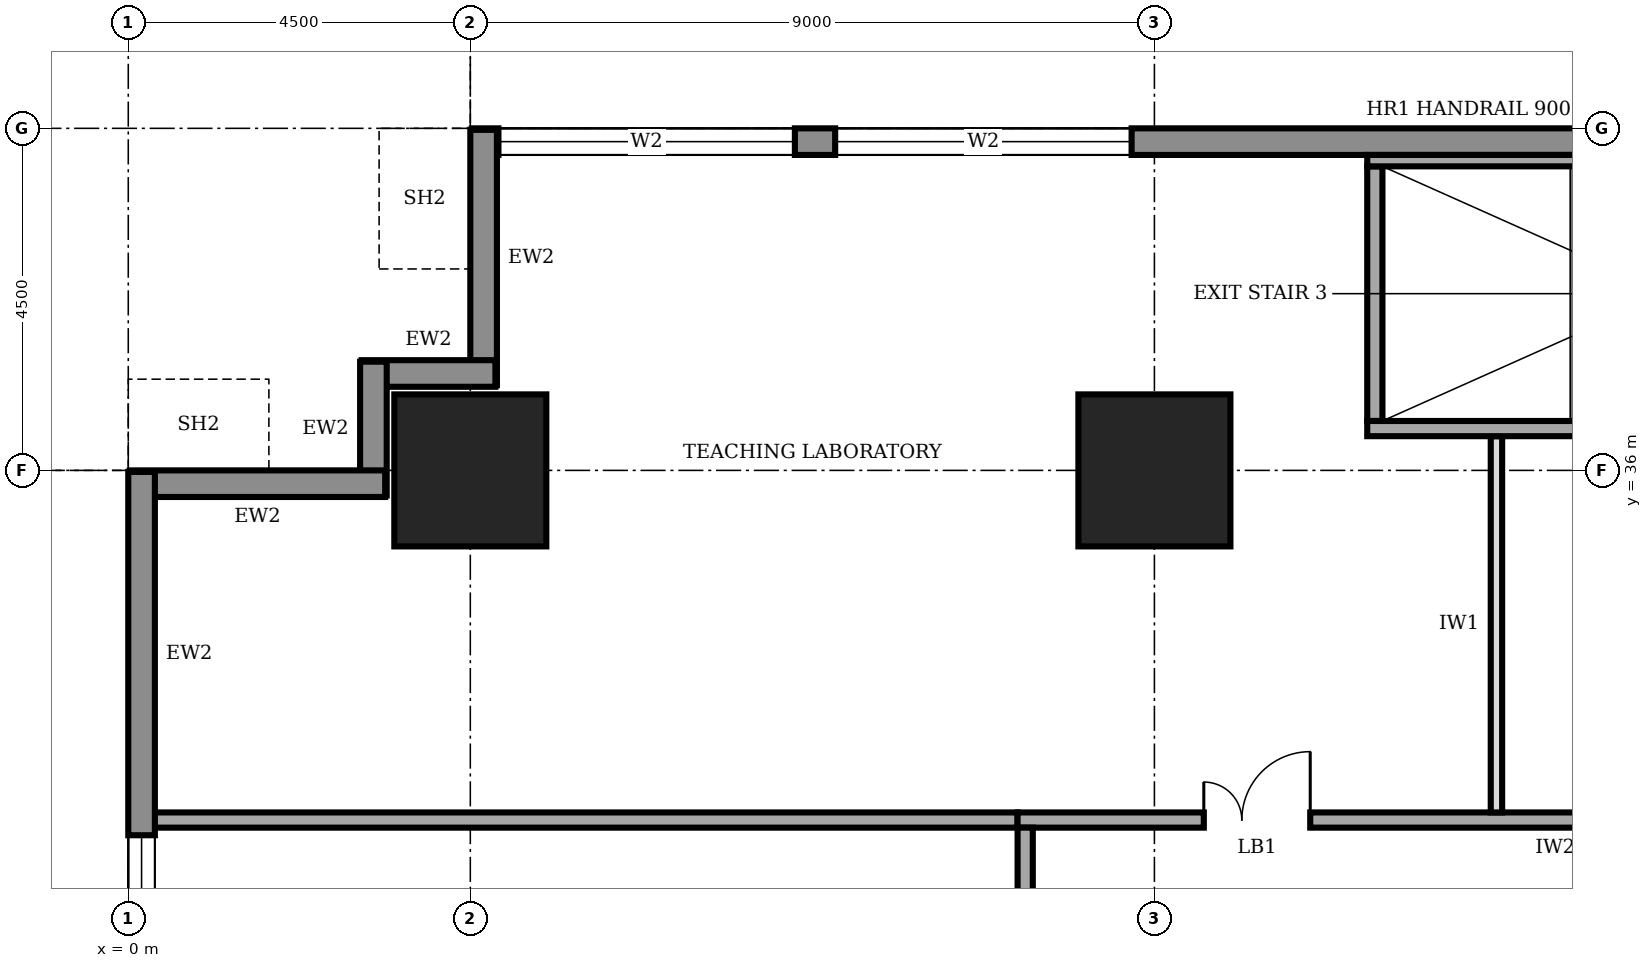
"""IFC4 building model, lengths in metres.
Left out: names, types, materials, properties, quantities, classifications, styles, units other than length and angle.
Written with IfcOpenShell. Run it as: python <this file> out.ifc"""

import sys

from ifc_helpers import new_model, si_unit, direction, frame, frame_2d, origin, origin_2d, place, context, subcontext, project, spatial, rectangle, extrude, element, fill, save


model = new_model("IFC4")
c1 = context("Model", 3, precision=1e-05, world=origin(), true_north=direction((0.0, 1.0)))
c2 = subcontext(c1, "Body", "Model", "MODEL_VIEW")
j1 = project(units=[si_unit("LENGTHUNIT", "METRE"), si_unit("PLANEANGLEUNIT", "RADIAN")], contexts=[c1])
p1 = place(None, origin())
s1 = spatial("IfcSite", under=j1, at=p1, CompositionType="ELEMENT")
p2 = place(p1, origin())
s2 = spatial("IfcBuilding", under=s1, at=p2, CompositionType="ELEMENT")
p3 = place(p2, frame((0.0, 0.0, 61.0)))
s3 = spatial("IfcBuildingStorey", under=s2, at=p3, CompositionType="ELEMENT", Elevation=61.0)
for number, where, z_axis, x_axis in (
    (1, (4.5, 36.0, 0.0), (0.0, 0.0, 1.0), (1.0, 0.0, 0.0)),
    (2, (13.5, 36.0, 0.0), (0.0, 0.0, 1.0), (1.0, 0.0, 0.0)),
):
    element("IfcColumn", number, at=place(p3, frame(where, z_axis=z_axis, x_axis=x_axis)), inside=s3, PredefinedType="COLUMN", context=c2, shape_type="SweptSolid", body=[
        extrude(rectangle(XDim=2.0, YDim=2.0, at=origin_2d()), origin(), (0.0, 0.0, 1.0), 4.0),
    ])
p4 = place(p3, frame((35.98, 40.325, 0.0), z_axis=(0.0, 0.0, 1.0), x_axis=(-1.0, 0.0, 0.0)))
e3 = element("IfcWall", 3, at=p4, inside=s3, PredefinedType="STANDARD", context=c2, shape_type="SweptSolid", body=[
    extrude(rectangle(XDim=31.46, YDim=0.35, at=frame_2d((15.73, 0.0))), origin(), (0.0, 0.0, 1.0), 3.75),
])
p5 = place(p4, frame((27.21, 0.0, 0.6)))
e4 = element("IfcOpeningElement", 4, at=p5, cuts=e3, PredefinedType="OPENING", context=c2, shape_type="SweptSolid", body=[
    extrude(rectangle(XDim=3.9, YDim=2.6, at=frame_2d((1.95, 1.3))), frame((0.0, 0.185, 0.0), z_axis=(0.0, -1.0, 0.0), x_axis=(1.0, 0.0, 0.0)), (0.0, 0.0, 1.0), 0.37),
])
p6 = place(p4, frame((22.78, 0.0, 0.6)))
e5 = element("IfcOpeningElement", 5, at=p6, cuts=e3, PredefinedType="OPENING", context=c2, shape_type="SweptSolid", body=[
    extrude(rectangle(XDim=3.9, YDim=2.6, at=frame_2d((1.95, 1.3))), frame((0.0, 0.185, 0.0), z_axis=(0.0, -1.0, 0.0), x_axis=(1.0, 0.0, 0.0)), (0.0, 0.0, 1.0), 0.37),
])
p7 = place(p4, frame((4.78, 0.0, 0.6)))
e6 = element("IfcOpeningElement", 6, at=p7, cuts=e3, PredefinedType="OPENING", context=c2, shape_type="SweptSolid", body=[
    extrude(rectangle(XDim=3.9, YDim=2.6, at=frame_2d((1.95, 1.3))), frame((0.0, 0.185, 0.0), z_axis=(0.0, -1.0, 0.0), x_axis=(1.0, 0.0, 0.0)), (0.0, 0.0, 1.0), 0.37),
])
p8 = place(p3, frame((4.675, 40.48, 0.0), z_axis=(0.0, 0.0, 1.0), x_axis=(0.0, -1.0, 0.0)))
e7 = element("IfcWall", 7, at=p8, inside=s3, PredefinedType="STANDARD", context=c2, shape_type="SweptSolid", body=[
    extrude(rectangle(XDim=3.36, YDim=0.35, at=frame_2d((1.68, 0.0))), origin(), (0.0, 0.0, 1.0), 2.85),
])
for number, where, z_axis, x_axis in (
    (8, (4.83, 37.275, 0.0), (0.0, 0.0, 1.0), (-1.0, 0.0, 0.0)),
    (9, (3.225, 37.43, 0.0), (0.0, 0.0, 1.0), (0.0, -1.0, 0.0)),
):
    element("IfcWall", number, at=place(p3, frame(where, z_axis=z_axis, x_axis=x_axis)), inside=s3, PredefinedType="STANDARD", context=c2, shape_type="SweptSolid", body=[
        extrude(rectangle(XDim=1.76, YDim=0.35, at=frame_2d((0.88, 0.0))), origin(), (0.0, 0.0, 1.0), 3.75),
    ])
p9 = place(p3, frame((3.38, 35.825, 0.0), z_axis=(0.0, 0.0, 1.0), x_axis=(-1.0, 0.0, 0.0)))
e10 = element("IfcWall", 10, at=p9, inside=s3, PredefinedType="STANDARD", context=c2, shape_type="SweptSolid", body=[
    extrude(rectangle(XDim=3.36, YDim=0.35, at=frame_2d((1.68, 0.0))), origin(), (0.0, 0.0, 1.0), 2.85),
])
p10 = place(p3, frame((0.175, 35.98, 0.0), z_axis=(0.0, 0.0, 1.0), x_axis=(0.0, -1.0, 0.0)))
e11 = element("IfcWall", 11, at=p10, inside=s3, PredefinedType="STANDARD", context=c2, shape_type="SweptSolid", body=[
    extrude(rectangle(XDim=31.46, YDim=0.35, at=frame_2d((15.73, 0.0))), origin(), (0.0, 0.0, 1.0), 3.75),
])
p11 = place(p10, frame((27.21, 0.0, 0.6)))
e12 = element("IfcOpeningElement", 12, at=p11, cuts=e11, PredefinedType="OPENING", context=c2, shape_type="SweptSolid", body=[
    extrude(rectangle(XDim=3.9, YDim=2.6, at=frame_2d((1.95, 1.3))), frame((0.0, 0.185, 0.0), z_axis=(0.0, -1.0, 0.0), x_axis=(1.0, 0.0, 0.0)), (0.0, 0.0, 1.0), 0.37),
])
p12 = place(p10, frame((22.78, 0.0, 0.6)))
e13 = element("IfcOpeningElement", 13, at=p12, cuts=e11, PredefinedType="OPENING", context=c2, shape_type="SweptSolid", body=[
    extrude(rectangle(XDim=3.9, YDim=2.6, at=frame_2d((1.95, 1.3))), frame((0.0, 0.185, 0.0), z_axis=(0.0, -1.0, 0.0), x_axis=(1.0, 0.0, 0.0)), (0.0, 0.0, 1.0), 0.37),
])
p13 = place(p10, frame((18.28, 0.0, 0.6)))
e14 = element("IfcOpeningElement", 14, at=p13, cuts=e11, PredefinedType="OPENING", context=c2, shape_type="SweptSolid", body=[
    extrude(rectangle(XDim=3.9, YDim=2.6, at=frame_2d((1.95, 1.3))), frame((0.0, 0.185, 0.0), z_axis=(0.0, -1.0, 0.0), x_axis=(1.0, 0.0, 0.0)), (0.0, 0.0, 1.0), 0.37),
])
p14 = place(p10, frame((13.78, 0.0, 0.6)))
e15 = element("IfcOpeningElement", 15, at=p14, cuts=e11, PredefinedType="OPENING", context=c2, shape_type="SweptSolid", body=[
    extrude(rectangle(XDim=3.9, YDim=2.6, at=frame_2d((1.95, 1.3))), frame((0.0, 0.185, 0.0), z_axis=(0.0, -1.0, 0.0), x_axis=(1.0, 0.0, 0.0)), (0.0, 0.0, 1.0), 0.37),
])
p15 = place(p10, frame((9.28, 0.0, 0.6)))
e16 = element("IfcOpeningElement", 16, at=p15, cuts=e11, PredefinedType="OPENING", context=c2, shape_type="SweptSolid", body=[
    extrude(rectangle(XDim=3.9, YDim=2.6, at=frame_2d((1.95, 1.3))), frame((0.0, 0.185, 0.0), z_axis=(0.0, -1.0, 0.0), x_axis=(1.0, 0.0, 0.0)), (0.0, 0.0, 1.0), 0.37),
])
p16 = place(p10, frame((4.78, 0.0, 0.6)))
e17 = element("IfcOpeningElement", 17, at=p16, cuts=e11, PredefinedType="OPENING", context=c2, shape_type="SweptSolid", body=[
    extrude(rectangle(XDim=3.9, YDim=2.6, at=frame_2d((1.95, 1.3))), frame((0.0, 0.185, 0.0), z_axis=(0.0, -1.0, 0.0), x_axis=(1.0, 0.0, 0.0)), (0.0, 0.0, 1.0), 0.37),
])
p17 = place(p3, frame((30.1, 31.4, 0.0), z_axis=(0.0, 0.0, 1.0), x_axis=(-1.0, 0.0, 0.0)))
e18 = element("IfcWall", 18, at=p17, inside=s3, PredefinedType="SOLIDWALL", context=c2, shape_type="SweptSolid", body=[
    extrude(rectangle(XDim=18.4, YDim=0.2, at=frame_2d((9.2, 0.0))), origin(), (0.0, 0.0, 1.0), 3.75),
])
p18 = place(p17, frame((14.55, 0.0, 0.0)))
e19 = element("IfcOpeningElement", 19, at=p18, cuts=e18, PredefinedType="OPENING", context=c2, shape_type="SweptSolid", body=[
    extrude(rectangle(XDim=1.4, YDim=2.1, at=frame_2d((0.7, 1.05))), frame((0.0, 0.11, 0.0), z_axis=(0.0, -1.0, 0.0), x_axis=(1.0, 0.0, 0.0)), (0.0, 0.0, 1.0), 0.22),
])
p19 = place(p17, frame((7.1, 0.0, 0.0)))
e20 = element("IfcOpeningElement", 20, at=p19, cuts=e18, PredefinedType="OPENING", context=c2, shape_type="SweptSolid", body=[
    extrude(rectangle(XDim=1.0, YDim=2.1, at=frame_2d((0.5, 1.05))), frame((0.0, 0.11, 0.0), z_axis=(0.0, -1.0, 0.0), x_axis=(1.0, 0.0, 0.0)), (0.0, 0.0, 1.0), 0.22),
])
p20 = place(p17, frame((0.55, 0.0, 0.0)))
e21 = element("IfcOpeningElement", 21, at=p20, cuts=e18, PredefinedType="OPENING", context=c2, shape_type="SweptSolid", body=[
    extrude(rectangle(XDim=1.8, YDim=2.1, at=frame_2d((0.9, 1.05))), frame((0.0, 0.11, 0.0), z_axis=(0.0, -1.0, 0.0), x_axis=(1.0, 0.0, 0.0)), (0.0, 0.0, 1.0), 0.22),
])
p21 = place(p3, frame((11.8, 31.3, 0.0), z_axis=(0.0, 0.0, 1.0), x_axis=(0.0, -1.0, 0.0)))
e22 = element("IfcWall", 22, at=p21, inside=s3, PredefinedType="SOLIDWALL", context=c2, shape_type="SweptSolid", body=[
    extrude(rectangle(XDim=22.3, YDim=0.2, at=frame_2d((11.15, 0.0))), origin(), (0.0, 0.0, 1.0), 3.75),
])
p22 = place(p21, frame((19.55, 0.0, 0.0)))
e23 = element("IfcOpeningElement", 23, at=p22, cuts=e22, PredefinedType="OPENING", context=c2, shape_type="SweptSolid", body=[
    extrude(rectangle(XDim=1.0, YDim=2.1, at=frame_2d((0.5, 1.05))), frame((0.0, 0.11, 0.0), z_axis=(0.0, -1.0, 0.0), x_axis=(1.0, 0.0, 0.0)), (0.0, 0.0, 1.0), 0.22),
])
p23 = place(p21, frame((16.2, 0.0, 0.0)))
e24 = element("IfcOpeningElement", 24, at=p23, cuts=e22, PredefinedType="OPENING", context=c2, shape_type="SweptSolid", body=[
    extrude(rectangle(XDim=1.0, YDim=2.1, at=frame_2d((0.5, 1.05))), frame((0.0, 0.11, 0.0), z_axis=(0.0, -1.0, 0.0), x_axis=(1.0, 0.0, 0.0)), (0.0, 0.0, 1.0), 0.22),
])
p24 = place(p21, frame((13.2, 0.0, 0.0)))
e25 = element("IfcOpeningElement", 25, at=p24, cuts=e22, PredefinedType="OPENING", context=c2, shape_type="SweptSolid", body=[
    extrude(rectangle(XDim=0.9, YDim=2.1, at=frame_2d((0.45, 1.05))), frame((0.0, 0.11, 0.0), z_axis=(0.0, -1.0, 0.0), x_axis=(1.0, 0.0, 0.0)), (0.0, 0.0, 1.0), 0.22),
])
p25 = place(p21, frame((10.15, 0.0, 0.0)))
e26 = element("IfcOpeningElement", 26, at=p25, cuts=e22, PredefinedType="OPENING", context=c2, shape_type="SweptSolid", body=[
    extrude(rectangle(XDim=0.9, YDim=2.1, at=frame_2d((0.45, 1.05))), frame((0.0, 0.11, 0.0), z_axis=(0.0, -1.0, 0.0), x_axis=(1.0, 0.0, 0.0)), (0.0, 0.0, 1.0), 0.22),
])
p26 = place(p21, frame((5.45, 0.0, 0.0)))
e27 = element("IfcOpeningElement", 27, at=p26, cuts=e22, PredefinedType="OPENING", context=c2, shape_type="SweptSolid", body=[
    extrude(rectangle(XDim=0.9, YDim=2.1, at=frame_2d((0.45, 1.05))), frame((0.0, 0.11, 0.0), z_axis=(0.0, -1.0, 0.0), x_axis=(1.0, 0.0, 0.0)), (0.0, 0.0, 1.0), 0.22),
])
p27 = place(p21, frame((8.0, 0.0, 0.0)))
e28 = element("IfcOpeningElement", 28, at=p27, cuts=e22, PredefinedType="OPENING", context=c2, shape_type="SweptSolid", body=[
    extrude(rectangle(XDim=1.0, YDim=2.1, at=frame_2d((0.5, 1.05))), frame((0.0, 0.11, 0.0), z_axis=(0.0, -1.0, 0.0), x_axis=(1.0, 0.0, 0.0)), (0.0, 0.0, 1.0), 0.22),
])
p28 = place(p21, frame((1.55, 0.0, 0.0)))
e29 = element("IfcOpeningElement", 29, at=p28, cuts=e22, PredefinedType="OPENING", context=c2, shape_type="SweptSolid", body=[
    extrude(rectangle(XDim=1.0, YDim=2.1, at=frame_2d((0.5, 1.05))), frame((0.0, 0.11, 0.0), z_axis=(0.0, -1.0, 0.0), x_axis=(1.0, 0.0, 0.0)), (0.0, 0.0, 1.0), 0.22),
])
p29 = place(p3, frame((0.3, 31.4, 0.0), z_axis=(0.0, 0.0, 1.0), x_axis=(1.0, 0.0, 0.0)))
e30 = element("IfcWall", 30, at=p29, inside=s3, PredefinedType="SOLIDWALL", context=c2, shape_type="SweptSolid", body=[
    extrude(rectangle(XDim=11.4, YDim=0.2, at=frame_2d((5.7, 0.0))), origin(), (0.0, 0.0, 1.0), 3.75),
])
p30 = place(p3, frame((18.0, 31.5, 0.0), z_axis=(0.0, 0.0, 1.0), x_axis=(0.0, 1.0, 0.0)))
e31 = element("IfcWall", 31, at=p30, inside=s3, PredefinedType="PARTITIONING", context=c2, shape_type="SweptSolid", body=[
    extrude(rectangle(XDim=4.95, YDim=0.15, at=frame_2d((2.475, 0.0))), origin(), (0.0, 0.0, 1.0), 3.75),
])
p31 = place(p3, frame((16.3, 36.55, 0.0), z_axis=(0.0, 0.0, 1.0), x_axis=(1.0, 0.0, 0.0)))
e32 = element("IfcWall", 32, at=p31, inside=s3, PredefinedType="SOLIDWALL", context=c2, shape_type="SweptSolid", body=[
    extrude(rectangle(XDim=7.9, YDim=0.2, at=frame_2d((3.95, 0.0))), origin(), (0.0, 0.0, 1.0), 3.75),
])
p32 = place(p31, frame((6.3, 0.0, 0.0)))
e33 = element("IfcOpeningElement", 33, at=p32, cuts=e32, PredefinedType="OPENING", context=c2, shape_type="SweptSolid", body=[
    extrude(rectangle(XDim=1.0, YDim=2.1, at=frame_2d((0.5, 1.05))), frame((0.0, 0.11, 0.0), z_axis=(0.0, -1.0, 0.0), x_axis=(1.0, 0.0, 0.0)), (0.0, 0.0, 1.0), 0.22),
])
p33 = place(p3, frame((16.3, 40.075, 0.0), z_axis=(0.0, 0.0, 1.0), x_axis=(1.0, 0.0, 0.0)))
e34 = element("IfcWall", 34, at=p33, inside=s3, PredefinedType="SOLIDWALL", context=c2, shape_type="SweptSolid", body=[
    extrude(rectangle(XDim=7.9, YDim=0.15, at=frame_2d((3.95, 0.0))), origin(), (0.0, 0.0, 1.0), 3.75),
])
p34 = place(p3, frame((16.4, 36.65, 0.0), z_axis=(0.0, 0.0, 1.0), x_axis=(0.0, 1.0, 0.0)))
e35 = element("IfcWall", 35, at=p34, inside=s3, PredefinedType="SOLIDWALL", context=c2, shape_type="SweptSolid", body=[
    extrude(rectangle(XDim=3.35, YDim=0.2, at=frame_2d((1.675, 0.0))), origin(), (0.0, 0.0, 1.0), 3.75),
])
p35 = place(p5, origin())
e36 = element("IfcWindow", 36, at=p35, inside=s3, PartitioningType="SINGLE_PANEL", PredefinedType="WINDOW", context=c2, shape_type="SweptSolid", body=[
    extrude(rectangle(XDim=3.9, YDim=2.6, at=frame_2d((1.95, 1.3))), frame((0.0, 0.03, 0.0), z_axis=(0.0, -1.0, 0.0), x_axis=(1.0, 0.0, 0.0)), (0.0, 0.0, 1.0), 0.06),
])
fill(e4, e36)
p36 = place(p6, origin())
e37 = element("IfcWindow", 37, at=p36, inside=s3, PartitioningType="SINGLE_PANEL", PredefinedType="WINDOW", context=c2, shape_type="SweptSolid", body=[
    extrude(rectangle(XDim=3.9, YDim=2.6, at=frame_2d((1.95, 1.3))), frame((0.0, 0.03, 0.0), z_axis=(0.0, -1.0, 0.0), x_axis=(1.0, 0.0, 0.0)), (0.0, 0.0, 1.0), 0.06),
])
fill(e5, e37)
p37 = place(p16, origin())
e38 = element("IfcWindow", 38, at=p37, inside=s3, PartitioningType="SINGLE_PANEL", PredefinedType="WINDOW", context=c2, shape_type="SweptSolid", body=[
    extrude(rectangle(XDim=3.9, YDim=2.6, at=frame_2d((1.95, 1.3))), frame((0.0, 0.03, 0.0), z_axis=(0.0, -1.0, 0.0), x_axis=(1.0, 0.0, 0.0)), (0.0, 0.0, 1.0), 0.06),
])
fill(e17, e38)
p38 = place(p18, frame((1.4, 0.0, 0.0), z_axis=(0.0, 0.0, 1.0), x_axis=(-1.0, 0.0, 0.0)))
e39 = element("IfcDoor", 39, at=p38, inside=s3, OperationType="DOUBLE_DOOR_SINGLE_SWING", PredefinedType="DOOR", context=c2, shape_type="SweptSolid", body=[
    extrude(rectangle(XDim=1.4, YDim=2.1, at=frame_2d((0.7, 1.05))), frame((0.0, 0.025, 0.0), z_axis=(0.0, -1.0, 0.0), x_axis=(1.0, 0.0, 0.0)), (0.0, 0.0, 1.0), 0.05),
])
fill(e19, e39)
save(model, sys.argv[1])
